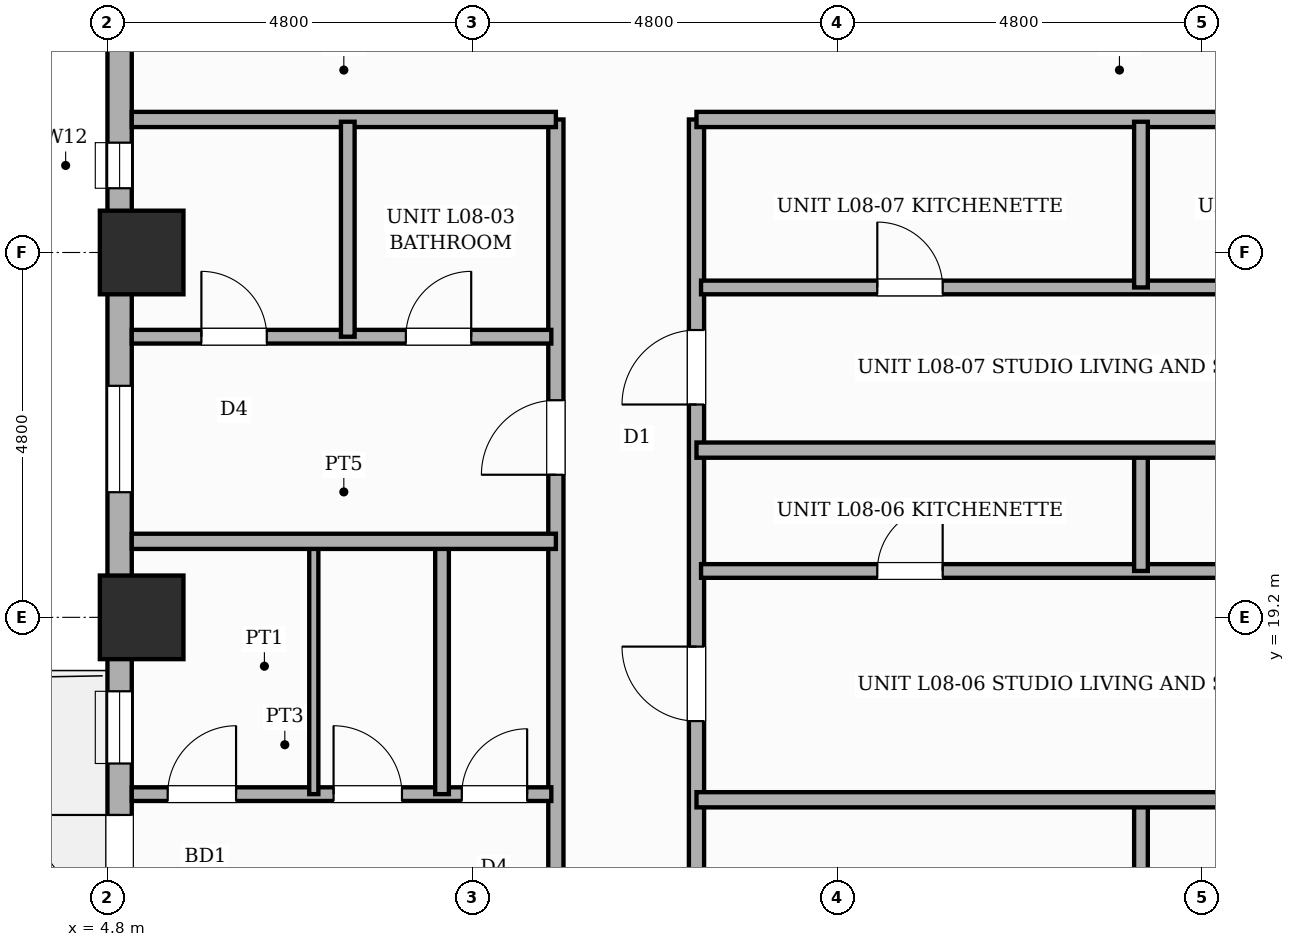
"""IFC4 building model, lengths in metres.
Left out: names, types, materials, properties, quantities, classifications, styles, units other than length and angle.
Written with IfcOpenShell. Run it as: python <this file> out.ifc"""

import sys

from ifc_helpers import new_model, si_unit, direction, frame, frame_2d, origin, origin_2d, place, context, subcontext, project, spatial, rectangle, extrude, element, fill, save


model = new_model("IFC4")
c1 = context("Model", 3, precision=1e-05, world=origin(), true_north=direction((0.0, 1.0)))
c2 = subcontext(c1, "Body", "Model", "MODEL_VIEW")
j1 = project(units=[si_unit("LENGTHUNIT", "METRE"), si_unit("PLANEANGLEUNIT", "RADIAN")], contexts=[c1])
p1 = place(None, origin())
s1 = spatial("IfcSite", under=j1, at=p1, CompositionType="ELEMENT")
p2 = place(p1, origin())
s2 = spatial("IfcBuilding", under=s1, at=p2, CompositionType="ELEMENT")
p3 = place(p2, frame((0.0, 0.0, 35.8)))
s3 = spatial("IfcBuildingStorey", under=s2, at=p3, CompositionType="ELEMENT", Elevation=35.8)
for number, where, z_axis, x_axis in (
    (1, (5.25, 19.2, 0.0), (0.0, 0.0, 1.0), (1.0, 0.0, 0.0)),
    (2, (5.25, 24.0, 0.0), (0.0, 0.0, 1.0), (1.0, 0.0, 0.0)),
):
    element("IfcColumn", number, at=place(p3, frame(where, z_axis=z_axis, x_axis=x_axis)), inside=s3, PredefinedType="COLUMN", context=c2, shape_type="SweptSolid", body=[
        extrude(rectangle(XDim=1.1, YDim=1.1, at=origin_2d()), origin(), (0.0, 0.0, 1.0), 3.6),
    ])
p4 = place(p3, frame((4.96, 7.2, 0.0), z_axis=(0.0, 0.0, 1.0), x_axis=(0.0, 1.0, 0.0)))
e3 = element("IfcWall", 3, at=p4, inside=s3, PredefinedType="STANDARD", context=c2, shape_type="SweptSolid", body=[
    extrude(rectangle(XDim=38.4, YDim=0.32, at=frame_2d((19.2, 0.0))), origin(), (0.0, 0.0, 1.0), 2.53),
])
p5 = place(p4, frame((8.3, 0.0, 0.0)))
e4 = element("IfcOpeningElement", 4, at=p5, cuts=e3, PredefinedType="OPENING", context=c2, shape_type="SweptSolid", body=[
    extrude(rectangle(XDim=1.1, YDim=2.15, at=frame_2d((0.55, 1.075))), frame((0.0, 0.17, 0.0), z_axis=(0.0, -1.0, 0.0), x_axis=(1.0, 0.0, 0.0)), (0.0, 0.0, 1.0), 0.34),
])
p6 = place(p4, frame((10.077, 0.0, 0.45)))
e5 = element("IfcOpeningElement", 5, at=p6, cuts=e3, PredefinedType="OPENING", context=c2, shape_type="SweptSolid", body=[
    extrude(rectangle(XDim=0.95, YDim=1.8, at=frame_2d((0.475, 0.9))), frame((0.0, 0.17, 0.0), z_axis=(0.0, -1.0, 0.0), x_axis=(1.0, 0.0, 0.0)), (0.0, 0.0, 1.0), 0.34),
])
p7 = place(p4, frame((13.646, 0.0, 0.65)))
e6 = element("IfcOpeningElement", 6, at=p7, cuts=e3, PredefinedType="OPENING", context=c2, shape_type="SweptSolid", body=[
    extrude(rectangle(XDim=1.4, YDim=1.1, at=frame_2d((0.7, 0.55))), frame((0.0, 0.17, 0.0), z_axis=(0.0, -1.0, 0.0), x_axis=(1.0, 0.0, 0.0)), (0.0, 0.0, 1.0), 0.34),
])
p8 = place(p4, frame((0.806, 0.0, 0.45)))
e7 = element("IfcOpeningElement", 7, at=p8, cuts=e3, PredefinedType="OPENING", context=c2, shape_type="SweptSolid", body=[
    extrude(rectangle(XDim=0.75, YDim=1.8, at=frame_2d((0.375, 0.9))), frame((0.0, 0.17, 0.0), z_axis=(0.0, -1.0, 0.0), x_axis=(1.0, 0.0, 0.0)), (0.0, 0.0, 1.0), 0.34),
])
p9 = place(p4, frame((17.645, 0.0, 0.45)))
e8 = element("IfcOpeningElement", 8, at=p9, cuts=e3, PredefinedType="OPENING", context=c2, shape_type="SweptSolid", body=[
    extrude(rectangle(XDim=0.6, YDim=1.8, at=frame_2d((0.3, 0.9))), frame((0.0, 0.17, 0.0), z_axis=(0.0, -1.0, 0.0), x_axis=(1.0, 0.0, 0.0)), (0.0, 0.0, 1.0), 0.34),
])
p10 = place(p3, frame((10.7, 5.12, 0.0), z_axis=(0.0, 0.0, 1.0), x_axis=(0.0, 1.0, 0.0)))
e9 = element("IfcWall", 9, at=p10, inside=s3, PredefinedType="PARTITIONING", context=c2, shape_type="SweptSolid", body=[
    extrude(rectangle(XDim=20.63, YDim=0.2, at=frame_2d((10.315, 0.0))), origin(), (0.0, 0.0, 1.0), 3.35),
])
p11 = place(p10, frame((1.028, 0.0, 0.0)))
e10 = element("IfcOpeningElement", 10, at=p11, cuts=e9, PredefinedType="OPENING", context=c2, shape_type="SweptSolid", body=[
    extrude(rectangle(XDim=0.98, YDim=2.18, at=frame_2d((0.49, 1.09))), frame((0.0, 0.11, 0.0), z_axis=(0.0, -1.0, 0.0), x_axis=(1.0, 0.0, 0.0)), (0.0, 0.0, 1.0), 0.22),
])
p12 = place(p10, frame((9.747, 0.0, 0.0)))
e11 = element("IfcOpeningElement", 11, at=p12, cuts=e9, PredefinedType="OPENING", context=c2, shape_type="SweptSolid", body=[
    extrude(rectangle(XDim=0.98, YDim=2.18, at=frame_2d((0.49, 1.09))), frame((0.0, 0.11, 0.0), z_axis=(0.0, -1.0, 0.0), x_axis=(1.0, 0.0, 0.0)), (0.0, 0.0, 1.0), 0.22),
])
p13 = place(p10, frame((15.956, 0.0, 0.0)))
e12 = element("IfcOpeningElement", 12, at=p13, cuts=e9, PredefinedType="OPENING", context=c2, shape_type="SweptSolid", body=[
    extrude(rectangle(XDim=0.98, YDim=2.18, at=frame_2d((0.49, 1.09))), frame((0.0, 0.11, 0.0), z_axis=(0.0, -1.0, 0.0), x_axis=(1.0, 0.0, 0.0)), (0.0, 0.0, 1.0), 0.22),
])
p14 = place(p3, frame((12.55, 5.12, 0.0), z_axis=(0.0, 0.0, 1.0), x_axis=(0.0, 1.0, 0.0)))
e13 = element("IfcWall", 13, at=p14, inside=s3, PredefinedType="PARTITIONING", context=c2, shape_type="SweptSolid", body=[
    extrude(rectangle(XDim=20.63, YDim=0.2, at=frame_2d((10.315, 0.0))), origin(), (0.0, 0.0, 1.0), 3.35),
])
p15 = place(p14, frame((1.004, 0.0, 0.0)))
e14 = element("IfcOpeningElement", 14, at=p15, cuts=e13, PredefinedType="OPENING", context=c2, shape_type="SweptSolid", body=[
    extrude(rectangle(XDim=0.98, YDim=2.18, at=frame_2d((0.49, 1.09))), frame((0.0, 0.11, 0.0), z_axis=(0.0, -1.0, 0.0), x_axis=(1.0, 0.0, 0.0)), (0.0, 0.0, 1.0), 0.22),
])
p16 = place(p14, frame((6.68, 0.0, 0.0)))
e15 = element("IfcOpeningElement", 15, at=p16, cuts=e13, PredefinedType="OPENING", context=c2, shape_type="SweptSolid", body=[
    extrude(rectangle(XDim=0.98, YDim=2.18, at=frame_2d((0.49, 1.09))), frame((0.0, 0.11, 0.0), z_axis=(0.0, -1.0, 0.0), x_axis=(1.0, 0.0, 0.0)), (0.0, 0.0, 1.0), 0.22),
])
p17 = place(p14, frame((12.715, 0.0, 0.0)))
e16 = element("IfcOpeningElement", 16, at=p17, cuts=e13, PredefinedType="OPENING", context=c2, shape_type="SweptSolid", body=[
    extrude(rectangle(XDim=0.98, YDim=2.18, at=frame_2d((0.49, 1.09))), frame((0.0, 0.11, 0.0), z_axis=(0.0, -1.0, 0.0), x_axis=(1.0, 0.0, 0.0)), (0.0, 0.0, 1.0), 0.22),
])
p18 = place(p14, frame((16.88, 0.0, 0.0)))
e17 = element("IfcOpeningElement", 17, at=p18, cuts=e13, PredefinedType="OPENING", context=c2, shape_type="SweptSolid", body=[
    extrude(rectangle(XDim=0.98, YDim=2.18, at=frame_2d((0.49, 1.09))), frame((0.0, 0.11, 0.0), z_axis=(0.0, -1.0, 0.0), x_axis=(1.0, 0.0, 0.0)), (0.0, 0.0, 1.0), 0.22),
])
p19 = place(p3, frame((5.12, 25.75, 0.0), z_axis=(0.0, 0.0, 1.0), x_axis=(1.0, 0.0, 0.0)))
e18 = element("IfcWall", 18, at=p19, inside=s3, PredefinedType="PARTITIONING", context=c2, shape_type="SweptSolid", body=[
    extrude(rectangle(XDim=5.58, YDim=0.2, at=frame_2d((2.79, 0.0))), origin(), (0.0, 0.0, 1.0), 3.35),
])
p20 = place(p3, frame((12.55, 25.75, 0.0), z_axis=(0.0, 0.0, 1.0), x_axis=(1.0, 0.0, 0.0)))
e19 = element("IfcWall", 19, at=p20, inside=s3, PredefinedType="PARTITIONING", context=c2, shape_type="SweptSolid", body=[
    extrude(rectangle(XDim=11.13, YDim=0.2, at=frame_2d((5.565, 0.0))), origin(), (0.0, 0.0, 1.0), 3.35),
])
p21 = place(p3, frame((5.12, 16.874, 0.0), z_axis=(0.0, 0.0, 1.0), x_axis=(1.0, 0.0, 0.0)))
e20 = element("IfcWall", 20, at=p21, inside=s3, PredefinedType="PLUMBINGWALL", context=c2, shape_type="SweptSolid", body=[
    extrude(rectangle(XDim=5.52, YDim=0.18, at=frame_2d((2.76, 0.0))), origin(), (0.0, 0.0, 1.0), 3.35),
])
p22 = place(p21, frame((0.472, 0.0, 0.0)))
e21 = element("IfcOpeningElement", 21, at=p22, cuts=e20, PredefinedType="OPENING", context=c2, shape_type="SweptSolid", body=[
    extrude(rectangle(XDim=0.9, YDim=2.15, at=frame_2d((0.45, 1.075))), frame((0.0, 0.1, 0.0), z_axis=(0.0, -1.0, 0.0), x_axis=(1.0, 0.0, 0.0)), (0.0, 0.0, 1.0), 0.2),
])
p23 = place(p21, frame((2.655, 0.0, 0.0)))
e22 = element("IfcOpeningElement", 22, at=p23, cuts=e20, PredefinedType="OPENING", context=c2, shape_type="SweptSolid", body=[
    extrude(rectangle(XDim=0.9, YDim=2.15, at=frame_2d((0.45, 1.075))), frame((0.0, 0.1, 0.0), z_axis=(0.0, -1.0, 0.0), x_axis=(1.0, 0.0, 0.0)), (0.0, 0.0, 1.0), 0.2),
])
p24 = place(p21, frame((4.342, 0.0, 0.0)))
e23 = element("IfcOpeningElement", 23, at=p24, cuts=e20, PredefinedType="OPENING", context=c2, shape_type="SweptSolid", body=[
    extrude(rectangle(XDim=0.86, YDim=2.1, at=frame_2d((0.43, 1.05))), frame((0.0, 0.1, 0.0), z_axis=(0.0, -1.0, 0.0), x_axis=(1.0, 0.0, 0.0)), (0.0, 0.0, 1.0), 0.2),
])
p25 = place(p3, frame((7.515, 16.874, 0.0), z_axis=(0.0, 0.0, 1.0), x_axis=(0.0, 1.0, 0.0)))
e24 = element("IfcWall", 24, at=p25, inside=s3, PredefinedType="PARTITIONING", context=c2, shape_type="SweptSolid", body=[
    extrude(rectangle(XDim=3.366, YDim=0.12, at=frame_2d((1.683, 0.0))), origin(), (0.0, 0.0, 1.0), 3.35),
])
p26 = place(p3, frame((9.202, 16.874, 0.0), z_axis=(0.0, 0.0, 1.0), x_axis=(0.0, 1.0, 0.0)))
e25 = element("IfcWall", 25, at=p26, inside=s3, PredefinedType="PLUMBINGWALL", context=c2, shape_type="SweptSolid", body=[
    extrude(rectangle(XDim=3.366, YDim=0.18, at=frame_2d((1.683, 0.0))), origin(), (0.0, 0.0, 1.0), 3.35),
])
p27 = place(p3, frame((5.12, 20.2, 0.0), z_axis=(0.0, 0.0, 1.0), x_axis=(1.0, 0.0, 0.0)))
e26 = element("IfcWall", 26, at=p27, inside=s3, PredefinedType="SOLIDWALL", context=c2, shape_type="SweptSolid", body=[
    extrude(rectangle(XDim=5.58, YDim=0.2, at=frame_2d((2.79, 0.0))), origin(), (0.0, 0.0, 1.0), 3.35),
])
p28 = place(p3, frame((5.12, 22.892, 0.0), z_axis=(0.0, 0.0, 1.0), x_axis=(1.0, 0.0, 0.0)))
e27 = element("IfcWall", 27, at=p28, inside=s3, PredefinedType="PLUMBINGWALL", context=c2, shape_type="SweptSolid", body=[
    extrude(rectangle(XDim=5.52, YDim=0.18, at=frame_2d((2.76, 0.0))), origin(), (0.0, 0.0, 1.0), 3.35),
])
p29 = place(p28, frame((0.916, 0.0, 0.0)))
e28 = element("IfcOpeningElement", 28, at=p29, cuts=e27, PredefinedType="OPENING", context=c2, shape_type="SweptSolid", body=[
    extrude(rectangle(XDim=0.86, YDim=2.1, at=frame_2d((0.43, 1.05))), frame((0.0, 0.1, 0.0), z_axis=(0.0, -1.0, 0.0), x_axis=(1.0, 0.0, 0.0)), (0.0, 0.0, 1.0), 0.2),
])
p30 = place(p28, frame((3.606, 0.0, 0.0)))
e29 = element("IfcOpeningElement", 29, at=p30, cuts=e27, PredefinedType="OPENING", context=c2, shape_type="SweptSolid", body=[
    extrude(rectangle(XDim=0.86, YDim=2.1, at=frame_2d((0.43, 1.05))), frame((0.0, 0.1, 0.0), z_axis=(0.0, -1.0, 0.0), x_axis=(1.0, 0.0, 0.0)), (0.0, 0.0, 1.0), 0.2),
])
p31 = place(p3, frame((7.962, 22.892, 0.0), z_axis=(0.0, 0.0, 1.0), x_axis=(0.0, 1.0, 0.0)))
e30 = element("IfcWall", 30, at=p31, inside=s3, PredefinedType="PLUMBINGWALL", context=c2, shape_type="SweptSolid", body=[
    extrude(rectangle(XDim=2.828, YDim=0.18, at=frame_2d((1.414, 0.0))), origin(), (0.0, 0.0, 1.0), 3.35),
])
p32 = place(p3, frame((18.398, 13.34, 0.0), z_axis=(0.0, 0.0, 1.0), x_axis=(0.0, 1.0, 0.0)))
e31 = element("IfcWall", 31, at=p32, inside=s3, PredefinedType="PLUMBINGWALL", context=c2, shape_type="SweptSolid", body=[
    extrude(rectangle(XDim=3.5, YDim=0.18, at=frame_2d((1.75, 0.0))), origin(), (0.0, 0.0, 1.0), 3.35),
])
p33 = place(p3, frame((12.55, 16.8, 0.0), z_axis=(0.0, 0.0, 1.0), x_axis=(1.0, 0.0, 0.0)))
e32 = element("IfcWall", 32, at=p33, inside=s3, PredefinedType="SOLIDWALL", context=c2, shape_type="SweptSolid", body=[
    extrude(rectangle(XDim=11.13, YDim=0.2, at=frame_2d((5.565, 0.0))), origin(), (0.0, 0.0, 1.0), 3.35),
])
p34 = place(p3, frame((12.61, 19.81, 0.0), z_axis=(0.0, 0.0, 1.0), x_axis=(1.0, 0.0, 0.0)))
e33 = element("IfcWall", 33, at=p34, inside=s3, PredefinedType="PLUMBINGWALL", context=c2, shape_type="SweptSolid", body=[
    extrude(rectangle(XDim=11.07, YDim=0.18, at=frame_2d((5.535, 0.0))), origin(), (0.0, 0.0, 1.0), 3.35),
])
p35 = place(p34, frame((2.319, 0.0, 0.0)))
e34 = element("IfcOpeningElement", 34, at=p35, cuts=e33, PredefinedType="OPENING", context=c2, shape_type="SweptSolid", body=[
    extrude(rectangle(XDim=0.86, YDim=2.1, at=frame_2d((0.43, 1.05))), frame((0.0, 0.1, 0.0), z_axis=(0.0, -1.0, 0.0), x_axis=(1.0, 0.0, 0.0)), (0.0, 0.0, 1.0), 0.2),
])
p36 = place(p34, frame((7.934, 0.0, 0.0)))
e35 = element("IfcOpeningElement", 35, at=p36, cuts=e33, PredefinedType="OPENING", context=c2, shape_type="SweptSolid", body=[
    extrude(rectangle(XDim=0.86, YDim=2.1, at=frame_2d((0.43, 1.05))), frame((0.0, 0.1, 0.0), z_axis=(0.0, -1.0, 0.0), x_axis=(1.0, 0.0, 0.0)), (0.0, 0.0, 1.0), 0.2),
])
p37 = place(p3, frame((18.398, 19.81, 0.0), z_axis=(0.0, 0.0, 1.0), x_axis=(0.0, 1.0, 0.0)))
e36 = element("IfcWall", 36, at=p37, inside=s3, PredefinedType="PLUMBINGWALL", context=c2, shape_type="SweptSolid", body=[
    extrude(rectangle(XDim=1.63, YDim=0.18, at=frame_2d((0.815, 0.0))), origin(), (0.0, 0.0, 1.0), 3.35),
])
p38 = place(p3, frame((12.55, 21.4, 0.0), z_axis=(0.0, 0.0, 1.0), x_axis=(1.0, 0.0, 0.0)))
e37 = element("IfcWall", 37, at=p38, inside=s3, PredefinedType="SOLIDWALL", context=c2, shape_type="SweptSolid", body=[
    extrude(rectangle(XDim=11.13, YDim=0.2, at=frame_2d((5.565, 0.0))), origin(), (0.0, 0.0, 1.0), 3.35),
])
p39 = place(p3, frame((12.61, 23.54, 0.0), z_axis=(0.0, 0.0, 1.0), x_axis=(1.0, 0.0, 0.0)))
e38 = element("IfcWall", 38, at=p39, inside=s3, PredefinedType="PLUMBINGWALL", context=c2, shape_type="SweptSolid", body=[
    extrude(rectangle(XDim=11.07, YDim=0.18, at=frame_2d((5.535, 0.0))), origin(), (0.0, 0.0, 1.0), 3.35),
])
p40 = place(p39, frame((2.319, 0.0, 0.0)))
e39 = element("IfcOpeningElement", 39, at=p40, cuts=e38, PredefinedType="OPENING", context=c2, shape_type="SweptSolid", body=[
    extrude(rectangle(XDim=0.86, YDim=2.1, at=frame_2d((0.43, 1.05))), frame((0.0, 0.1, 0.0), z_axis=(0.0, -1.0, 0.0), x_axis=(1.0, 0.0, 0.0)), (0.0, 0.0, 1.0), 0.2),
])
p41 = place(p39, frame((7.934, 0.0, 0.0)))
e40 = element("IfcOpeningElement", 40, at=p41, cuts=e38, PredefinedType="OPENING", context=c2, shape_type="SweptSolid", body=[
    extrude(rectangle(XDim=0.86, YDim=2.1, at=frame_2d((0.43, 1.05))), frame((0.0, 0.1, 0.0), z_axis=(0.0, -1.0, 0.0), x_axis=(1.0, 0.0, 0.0)), (0.0, 0.0, 1.0), 0.2),
])
p42 = place(p3, frame((18.398, 23.54, 0.0), z_axis=(0.0, 0.0, 1.0), x_axis=(0.0, 1.0, 0.0)))
e41 = element("IfcWall", 41, at=p42, inside=s3, PredefinedType="PLUMBINGWALL", context=c2, shape_type="SweptSolid", body=[
    extrude(rectangle(XDim=2.18, YDim=0.18, at=frame_2d((1.09, 0.0))), origin(), (0.0, 0.0, 1.0), 3.35),
])
p43 = place(p5, origin())
e42 = element("IfcDoor", 42, at=p43, inside=s3, OperationType="SINGLE_SWING_RIGHT", PredefinedType="DOOR", context=c2, shape_type="SweptSolid", body=[
    extrude(rectangle(XDim=1.1, YDim=2.15, at=frame_2d((0.55, 1.075))), frame((0.0, 0.025, 0.0), z_axis=(0.0, -1.0, 0.0), x_axis=(1.0, 0.0, 0.0)), (0.0, 0.0, 1.0), 0.05),
])
fill(e4, e42)
p44 = place(p6, origin())
e43 = element("IfcWindow", 43, at=p44, inside=s3, PartitioningType="SINGLE_PANEL", PredefinedType="WINDOW", context=c2, shape_type="SweptSolid", body=[
    extrude(rectangle(XDim=0.95, YDim=1.8, at=frame_2d((0.475, 0.9))), frame((0.0, 0.03, 0.0), z_axis=(0.0, -1.0, 0.0), x_axis=(1.0, 0.0, 0.0)), (0.0, 0.0, 1.0), 0.06),
])
fill(e5, e43)
p45 = place(p7, origin())
e44 = element("IfcWindow", 44, at=p45, inside=s3, PartitioningType="SINGLE_PANEL", PredefinedType="WINDOW", context=c2, shape_type="SweptSolid", body=[
    extrude(rectangle(XDim=1.4, YDim=1.1, at=frame_2d((0.7, 0.55))), frame((0.0, 0.03, 0.0), z_axis=(0.0, -1.0, 0.0), x_axis=(1.0, 0.0, 0.0)), (0.0, 0.0, 1.0), 0.06),
])
fill(e6, e44)
p46 = place(p9, origin())
e45 = element("IfcWindow", 45, at=p46, inside=s3, PartitioningType="SINGLE_PANEL", PredefinedType="WINDOW", context=c2, shape_type="SweptSolid", body=[
    extrude(rectangle(XDim=0.6, YDim=1.8, at=frame_2d((0.3, 0.9))), frame((0.0, 0.03, 0.0), z_axis=(0.0, -1.0, 0.0), x_axis=(1.0, 0.0, 0.0)), (0.0, 0.0, 1.0), 0.06),
])
fill(e8, e45)
p47 = place(p22, origin())
e46 = element("IfcDoor", 46, at=p47, inside=s3, OperationType="SINGLE_SWING_RIGHT", PredefinedType="DOOR", context=c2, shape_type="SweptSolid", body=[
    extrude(rectangle(XDim=0.9, YDim=2.15, at=frame_2d((0.45, 1.075))), frame((0.0, 0.025, 0.0), z_axis=(0.0, -1.0, 0.0), x_axis=(1.0, 0.0, 0.0)), (0.0, 0.0, 1.0), 0.05),
])
fill(e21, e46)
p48 = place(p23, origin())
e47 = element("IfcDoor", 47, at=p48, inside=s3, OperationType="SINGLE_SWING_LEFT", PredefinedType="DOOR", context=c2, shape_type="SweptSolid", body=[
    extrude(rectangle(XDim=0.9, YDim=2.15, at=frame_2d((0.45, 1.075))), frame((0.0, 0.025, 0.0), z_axis=(0.0, -1.0, 0.0), x_axis=(1.0, 0.0, 0.0)), (0.0, 0.0, 1.0), 0.05),
])
fill(e22, e47)
p49 = place(p24, origin())
e48 = element("IfcDoor", 48, at=p49, inside=s3, OperationType="SINGLE_SWING_RIGHT", PredefinedType="DOOR", context=c2, shape_type="SweptSolid", body=[
    extrude(rectangle(XDim=0.86, YDim=2.1, at=frame_2d((0.43, 1.05))), frame((0.0, 0.025, 0.0), z_axis=(0.0, -1.0, 0.0), x_axis=(1.0, 0.0, 0.0)), (0.0, 0.0, 1.0), 0.05),
])
fill(e23, e48)
p50 = place(p13, origin())
e49 = element("IfcDoor", 49, at=p50, inside=s3, OperationType="SINGLE_SWING_LEFT", PredefinedType="DOOR", context=c2, shape_type="SweptSolid", body=[
    extrude(rectangle(XDim=0.98, YDim=2.18, at=frame_2d((0.49, 1.09))), frame((0.0, 0.025, 0.0), z_axis=(0.0, -1.0, 0.0), x_axis=(1.0, 0.0, 0.0)), (0.0, 0.0, 1.0), 0.05),
])
fill(e12, e49)
p51 = place(p29, origin())
e50 = element("IfcDoor", 50, at=p51, inside=s3, OperationType="SINGLE_SWING_LEFT", PredefinedType="DOOR", context=c2, shape_type="SweptSolid", body=[
    extrude(rectangle(XDim=0.86, YDim=2.1, at=frame_2d((0.43, 1.05))), frame((0.0, 0.025, 0.0), z_axis=(0.0, -1.0, 0.0), x_axis=(1.0, 0.0, 0.0)), (0.0, 0.0, 1.0), 0.05),
])
fill(e28, e50)
p52 = place(p30, origin())
e51 = element("IfcDoor", 51, at=p52, inside=s3, OperationType="SINGLE_SWING_RIGHT", PredefinedType="DOOR", context=c2, shape_type="SweptSolid", body=[
    extrude(rectangle(XDim=0.86, YDim=2.1, at=frame_2d((0.43, 1.05))), frame((0.0, 0.025, 0.0), z_axis=(0.0, -1.0, 0.0), x_axis=(1.0, 0.0, 0.0)), (0.0, 0.0, 1.0), 0.05),
])
fill(e29, e51)
p53 = place(p17, origin())
e52 = element("IfcDoor", 52, at=p53, inside=s3, OperationType="SINGLE_SWING_RIGHT", PredefinedType="DOOR", context=c2, shape_type="SweptSolid", body=[
    extrude(rectangle(XDim=0.98, YDim=2.18, at=frame_2d((0.49, 1.09))), frame((0.0, 0.025, 0.0), z_axis=(0.0, -1.0, 0.0), x_axis=(1.0, 0.0, 0.0)), (0.0, 0.0, 1.0), 0.05),
])
fill(e16, e52)
p54 = place(p35, origin())
e53 = element("IfcDoor", 53, at=p54, inside=s3, OperationType="SINGLE_SWING_RIGHT", PredefinedType="DOOR", context=c2, shape_type="SweptSolid", body=[
    extrude(rectangle(XDim=0.86, YDim=2.1, at=frame_2d((0.43, 1.05))), frame((0.0, 0.025, 0.0), z_axis=(0.0, -1.0, 0.0), x_axis=(1.0, 0.0, 0.0)), (0.0, 0.0, 1.0), 0.05),
])
fill(e34, e53)
p55 = place(p18, origin())
e54 = element("IfcDoor", 54, at=p55, inside=s3, OperationType="SINGLE_SWING_LEFT", PredefinedType="DOOR", context=c2, shape_type="SweptSolid", body=[
    extrude(rectangle(XDim=0.98, YDim=2.18, at=frame_2d((0.49, 1.09))), frame((0.0, 0.025, 0.0), z_axis=(0.0, -1.0, 0.0), x_axis=(1.0, 0.0, 0.0)), (0.0, 0.0, 1.0), 0.05),
])
fill(e17, e54)
p56 = place(p40, origin())
e55 = element("IfcDoor", 55, at=p56, inside=s3, OperationType="SINGLE_SWING_LEFT", PredefinedType="DOOR", context=c2, shape_type="SweptSolid", body=[
    extrude(rectangle(XDim=0.86, YDim=2.1, at=frame_2d((0.43, 1.05))), frame((0.0, 0.025, 0.0), z_axis=(0.0, -1.0, 0.0), x_axis=(1.0, 0.0, 0.0)), (0.0, 0.0, 1.0), 0.05),
])
fill(e39, e55)
save(model, sys.argv[1])
